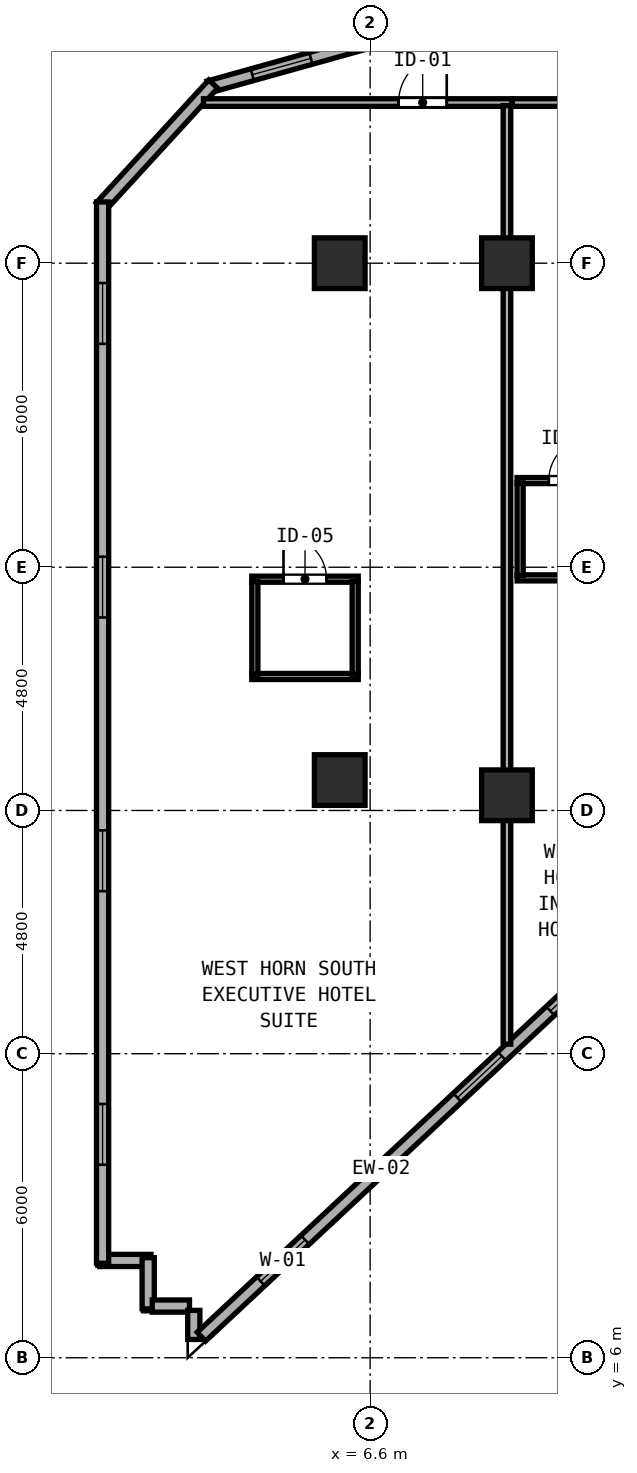
"""IFC4 building model, lengths in metres.
Left out: names, types, materials, properties, quantities, classifications, styles, units other than length and angle.
Written with IfcOpenShell. Run it as: python <this file> out.ifc"""

import sys

from ifc_helpers import new_model, si_unit, direction, frame, frame_2d, origin, origin_2d, place, context, subcontext, project, spatial, rectangle, hollow_rectangle, extrude, element, fill, save


model = new_model("IFC4")
c1 = context("Model", 3, precision=1e-05, world=origin(), true_north=direction((0.0, 1.0)))
c2 = subcontext(c1, "Body", "Model", "MODEL_VIEW")
j1 = project(units=[si_unit("LENGTHUNIT", "METRE"), si_unit("PLANEANGLEUNIT", "RADIAN")], contexts=[c1])
p1 = place(None, origin())
s1 = spatial("IfcSite", under=j1, at=p1, CompositionType="ELEMENT")
p2 = place(p1, origin())
s2 = spatial("IfcBuilding", under=s1, at=p2, CompositionType="ELEMENT")
p3 = place(p2, frame((0.0, 0.0, 85.6)))
s3 = spatial("IfcBuildingStorey", under=s2, at=p3, CompositionType="ELEMENT", Elevation=85.6)
for number, where, z_axis, x_axis in (
    (1, (6.0, 17.4, 0.0), (0.0, 0.0, 1.0), (1.0, 0.0, 0.0)),
    (2, (6.0, 27.6, 0.0), (0.0, 0.0, 1.0), (1.0, 0.0, 0.0)),
    (3, (9.3, 17.1, 0.0), (0.0, 0.0, 1.0), (1.0, 0.0, 0.0)),
    (4, (9.3, 27.6, 0.0), (0.0, 0.0, 1.0), (1.0, 0.0, 0.0)),
):
    element("IfcColumn", number, at=place(p3, frame(where, z_axis=z_axis, x_axis=x_axis)), inside=s3, PredefinedType="COLUMN", context=c2, shape_type="SweptSolid", body=[
        extrude(hollow_rectangle(XDim=1.0, YDim=1.0, WallThickness=0.038, at=origin_2d()), origin(), (0.0, 0.0, 1.0), 3.8),
    ])
for number, where, z_axis, x_axis in (
    (5, (1.265, 7.92, 0.0), (0.0, 0.0, 1.0), (1.0, 0.0, 0.0)),
    (6, (2.22, 7.975, 0.0), (0.0, 0.0, 1.0), (0.0, -1.0, 0.0)),
):
    element("IfcWall", number, at=place(p3, frame(where, z_axis=z_axis, x_axis=x_axis)), inside=s3, PredefinedType="SOLIDWALL", context=c2, shape_type="SweptSolid", body=[
        extrude(rectangle(XDim=1.01, YDim=0.24, at=frame_2d((0.505, 0.0))), origin(), (0.0, 0.0, 1.0), 3.54),
    ])
p4 = place(p3, frame((2.3, 7.02, 0.0), z_axis=(0.0, 0.0, 1.0), x_axis=(1.0, 0.0, 0.0)))
e7 = element("IfcWall", 7, at=p4, inside=s3, PredefinedType="SOLIDWALL", context=c2, shape_type="SweptSolid", body=[
    extrude(rectangle(XDim=0.735, YDim=0.24, at=frame_2d((0.367, 0.0))), origin(), (0.0, 0.0, 1.0), 3.54),
])
p5 = place(p3, frame((3.12, 6.935, 0.0), z_axis=(0.0, 0.0, 1.0), x_axis=(0.0, -1.0, 0.0)))
e8 = element("IfcWall", 8, at=p5, inside=s3, PredefinedType="SOLIDWALL", context=c2, shape_type="SweptSolid", body=[
    extrude(rectangle(XDim=0.574, YDim=0.24, at=frame_2d((0.287, 0.0))), origin(), (0.0, 0.0, 1.0), 3.54),
])
p6 = place(p3, frame((3.27, 6.416, 0.0), z_axis=(0.0, 0.0, 1.0), x_axis=(0.731064187858, 0.682308693505, 0.0)))
e9 = element("IfcWall", 9, at=p6, inside=s3, PredefinedType="SOLIDWALL", context=c2, shape_type="SweptSolid", body=[
    extrude(rectangle(XDim=11.833, YDim=0.24, at=frame_2d((5.916, 0.0))), origin(), (0.0, 0.0, 1.0), 3.54),
])
p7 = place(p6, frame((1.6, 0.0, 0.85)))
e10 = element("IfcOpeningElement", 10, at=p7, cuts=e9, PredefinedType="OPENING", context=c2, shape_type="SweptSolid", body=[
    extrude(rectangle(XDim=1.2, YDim=1.85, at=frame_2d((0.6, 0.925))), frame((0.0, 0.13, 0.0), z_axis=(0.0, -1.0, 0.0), x_axis=(1.0, 0.0, 0.0)), (0.0, 0.0, 1.0), 0.26),
])
p8 = place(p6, frame((6.912, 0.0, 0.85)))
e11 = element("IfcOpeningElement", 11, at=p8, cuts=e9, PredefinedType="OPENING", context=c2, shape_type="SweptSolid", body=[
    extrude(rectangle(XDim=1.2, YDim=1.85, at=frame_2d((0.6, 0.925))), frame((0.0, 0.13, 0.0), z_axis=(0.0, -1.0, 0.0), x_axis=(1.0, 0.0, 0.0)), (0.0, 0.0, 1.0), 0.26),
])
p9 = place(p6, frame((9.421, 0.0, 0.85)))
e12 = element("IfcOpeningElement", 12, at=p9, cuts=e9, PredefinedType="OPENING", context=c2, shape_type="SweptSolid", body=[
    extrude(rectangle(XDim=1.2, YDim=1.85, at=frame_2d((0.6, 0.925))), frame((0.0, 0.13, 0.0), z_axis=(0.0, -1.0, 0.0), x_axis=(1.0, 0.0, 0.0)), (0.0, 0.0, 1.0), 0.26),
])
p10 = place(p3, frame((12.173, 33.524, 0.0), z_axis=(0.0, 0.0, 1.0), x_axis=(-0.963197271032, -0.268795493036, 0.0)))
e13 = element("IfcWall", 13, at=p10, inside=s3, PredefinedType="SOLIDWALL", context=c2, shape_type="SweptSolid", body=[
    extrude(rectangle(XDim=9.095, YDim=0.24, at=frame_2d((4.548, 0.0))), origin(), (0.0, 0.0, 1.0), 3.54),
])
p11 = place(p10, frame((1.6, 0.0, 0.85)))
e14 = element("IfcOpeningElement", 14, at=p11, cuts=e13, PredefinedType="OPENING", context=c2, shape_type="SweptSolid", body=[
    extrude(rectangle(XDim=1.2, YDim=1.85, at=frame_2d((0.6, 0.925))), frame((0.0, 0.13, 0.0), z_axis=(0.0, -1.0, 0.0), x_axis=(1.0, 0.0, 0.0)), (0.0, 0.0, 1.0), 0.26),
])
p12 = place(p10, frame((7.0, 0.0, 0.85)))
e15 = element("IfcOpeningElement", 15, at=p12, cuts=e13, PredefinedType="OPENING", context=c2, shape_type="SweptSolid", body=[
    extrude(rectangle(XDim=1.2, YDim=1.85, at=frame_2d((0.6, 0.925))), frame((0.0, 0.13, 0.0), z_axis=(0.0, -1.0, 0.0), x_axis=(1.0, 0.0, 0.0)), (0.0, 0.0, 1.0), 0.26),
])
p13 = place(p3, frame((3.502, 31.134, 0.0), z_axis=(0.0, 0.0, 1.0), x_axis=(-0.675781844312, -0.737101688302, 0.0)))
e16 = element("IfcWall", 16, at=p13, inside=s3, PredefinedType="SOLIDWALL", context=c2, shape_type="SweptSolid", body=[
    extrude(rectangle(XDim=3.285, YDim=0.24, at=frame_2d((1.642, 0.0))), origin(), (0.0, 0.0, 1.0), 3.54),
])
p14 = place(p3, frame((1.32, 28.808, 0.0), z_axis=(0.0, 0.0, 1.0), x_axis=(0.0, -1.0, 0.0)))
e17 = element("IfcWall", 17, at=p14, inside=s3, PredefinedType="SOLIDWALL", context=c2, shape_type="SweptSolid", body=[
    extrude(rectangle(XDim=20.943, YDim=0.24, at=frame_2d((10.472, 0.0))), origin(), (0.0, 0.0, 1.0), 3.54),
])
p15 = place(p14, frame((1.6, 0.0, 0.85)))
e18 = element("IfcOpeningElement", 18, at=p15, cuts=e17, PredefinedType="OPENING", context=c2, shape_type="SweptSolid", body=[
    extrude(rectangle(XDim=1.2, YDim=1.85, at=frame_2d((0.6, 0.925))), frame((0.0, 0.13, 0.0), z_axis=(0.0, -1.0, 0.0), x_axis=(1.0, 0.0, 0.0)), (0.0, 0.0, 1.0), 0.26),
])
p16 = place(p14, frame((7.0, 0.0, 0.85)))
e19 = element("IfcOpeningElement", 19, at=p16, cuts=e17, PredefinedType="OPENING", context=c2, shape_type="SweptSolid", body=[
    extrude(rectangle(XDim=1.2, YDim=1.85, at=frame_2d((0.6, 0.925))), frame((0.0, 0.13, 0.0), z_axis=(0.0, -1.0, 0.0), x_axis=(1.0, 0.0, 0.0)), (0.0, 0.0, 1.0), 0.26),
])
p17 = place(p14, frame((12.4, 0.0, 0.85)))
e20 = element("IfcOpeningElement", 20, at=p17, cuts=e17, PredefinedType="OPENING", context=c2, shape_type="SweptSolid", body=[
    extrude(rectangle(XDim=1.2, YDim=1.85, at=frame_2d((0.6, 0.925))), frame((0.0, 0.13, 0.0), z_axis=(0.0, -1.0, 0.0), x_axis=(1.0, 0.0, 0.0)), (0.0, 0.0, 1.0), 0.26),
])
p18 = place(p14, frame((17.8, 0.0, 0.85)))
e21 = element("IfcOpeningElement", 21, at=p18, cuts=e17, PredefinedType="OPENING", context=c2, shape_type="SweptSolid", body=[
    extrude(rectangle(XDim=1.2, YDim=1.85, at=frame_2d((0.6, 0.925))), frame((0.0, 0.13, 0.0), z_axis=(0.0, -1.0, 0.0), x_axis=(1.0, 0.0, 0.0)), (0.0, 0.0, 1.0), 0.26),
])
p19 = place(p3, frame((3.311, 30.77, 0.0), z_axis=(0.0, 0.0, 1.0), x_axis=(1.0, 0.0, 0.0)))
e22 = element("IfcWall", 22, at=p19, inside=s3, PredefinedType="PARTITIONING", context=c2, shape_type="SweptSolid", body=[
    extrude(rectangle(XDim=6.089, YDim=0.15, at=frame_2d((3.044, 0.0))), origin(), (0.0, 0.0, 1.0), 3.54),
])
p20 = place(p19, frame((4.801, 0.0, 0.0), z_axis=(0.0, 0.0, 1.0), x_axis=(-1.0, 0.0, 0.0)))
e23 = element("IfcOpeningElement", 23, at=p20, cuts=e22, PredefinedType="OPENING", context=c2, shape_type="SweptSolid", body=[
    extrude(rectangle(XDim=0.95, YDim=2.18, at=frame_2d((0.475, 1.09))), frame((0.0, 0.085, 0.0), z_axis=(0.0, -1.0, 0.0), x_axis=(1.0, 0.0, 0.0)), (0.0, 0.0, 1.0), 0.17),
])
p21 = place(p3, frame((9.3, 12.188, 0.0), z_axis=(0.0, 0.0, 1.0), x_axis=(0.0, 1.0, 0.0)))
e24 = element("IfcWall", 24, at=p21, inside=s3, PredefinedType="PARTITIONING", context=c2, shape_type="SweptSolid", body=[
    extrude(rectangle(XDim=18.522, YDim=0.15, at=frame_2d((9.261, 0.0))), origin(), (0.0, 0.0, 1.0), 3.54),
])
p22 = place(p3, frame((4.265, 21.364, 0.0), z_axis=(0.0, 0.0, 1.0), x_axis=(1.0, 0.0, 0.0)))
e25 = element("IfcWall", 25, at=p22, inside=s3, PredefinedType="PARTITIONING", context=c2, shape_type="SweptSolid", body=[
    extrude(rectangle(XDim=2.1, YDim=0.12, at=frame_2d((1.05, 0.0))), origin(), (0.0, 0.0, 1.0), 3.54),
])
p23 = place(p22, frame((1.475, 0.0, 0.0), z_axis=(0.0, 0.0, 1.0), x_axis=(-1.0, 0.0, 0.0)))
e26 = element("IfcOpeningElement", 26, at=p23, cuts=e25, PredefinedType="OPENING", context=c2, shape_type="SweptSolid", body=[
    extrude(rectangle(XDim=0.85, YDim=2.1, at=frame_2d((0.425, 1.05))), frame((0.0, 0.07, 0.0), z_axis=(0.0, -1.0, 0.0), x_axis=(1.0, 0.0, 0.0)), (0.0, 0.0, 1.0), 0.14),
])
p24 = place(p3, frame((4.265, 19.444, 0.0), z_axis=(0.0, 0.0, 1.0), x_axis=(1.0, 0.0, 0.0)))
e27 = element("IfcWall", 27, at=p24, inside=s3, PredefinedType="PARTITIONING", context=c2, shape_type="SweptSolid", body=[
    extrude(rectangle(XDim=2.1, YDim=0.12, at=frame_2d((1.05, 0.0))), origin(), (0.0, 0.0, 1.0), 3.54),
])
for number, where, z_axis, x_axis in (
    (28, (4.325, 19.489, 0.0), (0.0, 0.0, 1.0), (0.0, 1.0, 0.0)),
    (29, (6.305, 19.489, 0.0), (0.0, 0.0, 1.0), (0.0, 1.0, 0.0)),
):
    element("IfcWall", number, at=place(p3, frame(where, z_axis=z_axis, x_axis=x_axis)), inside=s3, PredefinedType="PARTITIONING", context=c2, shape_type="SweptSolid", body=[
        extrude(rectangle(XDim=1.83, YDim=0.12, at=frame_2d((0.915, 0.0))), origin(), (0.0, 0.0, 1.0), 3.54),
    ])
p25 = place(p3, frame((9.402, 30.77, 0.0), z_axis=(0.0, 0.0, 1.0), x_axis=(1.0, 0.0, 0.0)))
e30 = element("IfcWall", 30, at=p25, inside=s3, PredefinedType="PARTITIONING", context=c2, shape_type="SweptSolid", body=[
    extrude(rectangle(XDim=2.296, YDim=0.15, at=frame_2d((1.148, 0.0))), origin(), (0.0, 0.0, 1.0), 3.54),
])
p26 = place(p25, frame((1.934, 0.0, 0.0), z_axis=(0.0, 0.0, 1.0), x_axis=(-1.0, 0.0, 0.0)))
e31 = element("IfcOpeningElement", 31, at=p26, cuts=e30, PredefinedType="OPENING", context=c2, shape_type="SweptSolid", body=[
    extrude(rectangle(XDim=0.95, YDim=2.15, at=frame_2d((0.475, 1.075))), frame((0.0, 0.085, 0.0), z_axis=(0.0, -1.0, 0.0), x_axis=(1.0, 0.0, 0.0)), (0.0, 0.0, 1.0), 0.17),
])
p27 = place(p3, frame((9.5, 23.31, 0.0), z_axis=(0.0, 0.0, 1.0), x_axis=(1.0, 0.0, 0.0)))
e32 = element("IfcWall", 32, at=p27, inside=s3, PredefinedType="PARTITIONING", context=c2, shape_type="SweptSolid", body=[
    extrude(rectangle(XDim=2.1, YDim=0.12, at=frame_2d((1.05, 0.0))), origin(), (0.0, 0.0, 1.0), 3.54),
])
p28 = place(p27, frame((1.475, 0.0, 0.0), z_axis=(0.0, 0.0, 1.0), x_axis=(-1.0, 0.0, 0.0)))
e33 = element("IfcOpeningElement", 33, at=p28, cuts=e32, PredefinedType="OPENING", context=c2, shape_type="SweptSolid", body=[
    extrude(rectangle(XDim=0.85, YDim=2.1, at=frame_2d((0.425, 1.05))), frame((0.0, 0.07, 0.0), z_axis=(0.0, -1.0, 0.0), x_axis=(1.0, 0.0, 0.0)), (0.0, 0.0, 1.0), 0.14),
])
p29 = place(p3, frame((9.5, 21.39, 0.0), z_axis=(0.0, 0.0, 1.0), x_axis=(1.0, 0.0, 0.0)))
e34 = element("IfcWall", 34, at=p29, inside=s3, PredefinedType="PARTITIONING", context=c2, shape_type="SweptSolid", body=[
    extrude(rectangle(XDim=2.1, YDim=0.12, at=frame_2d((1.05, 0.0))), origin(), (0.0, 0.0, 1.0), 3.54),
])
p30 = place(p3, frame((9.56, 21.435, 0.0), z_axis=(0.0, 0.0, 1.0), x_axis=(0.0, 1.0, 0.0)))
e35 = element("IfcWall", 35, at=p30, inside=s3, PredefinedType="PARTITIONING", context=c2, shape_type="SweptSolid", body=[
    extrude(rectangle(XDim=1.83, YDim=0.12, at=frame_2d((0.915, 0.0))), origin(), (0.0, 0.0, 1.0), 3.54),
])
p31 = place(p7, origin())
e36 = element("IfcWindow", 36, at=p31, inside=s3, PartitioningType="SINGLE_PANEL", PredefinedType="WINDOW", context=c2, shape_type="SweptSolid", body=[
    extrude(rectangle(XDim=1.2, YDim=1.85, at=frame_2d((0.6, 0.925))), frame((0.0, 0.03, 0.0), z_axis=(0.0, -1.0, 0.0), x_axis=(1.0, 0.0, 0.0)), (0.0, 0.0, 1.0), 0.06),
])
fill(e10, e36)
p32 = place(p8, origin())
e37 = element("IfcWindow", 37, at=p32, inside=s3, PartitioningType="SINGLE_PANEL", PredefinedType="WINDOW", context=c2, shape_type="SweptSolid", body=[
    extrude(rectangle(XDim=1.2, YDim=1.85, at=frame_2d((0.6, 0.925))), frame((0.0, 0.03, 0.0), z_axis=(0.0, -1.0, 0.0), x_axis=(1.0, 0.0, 0.0)), (0.0, 0.0, 1.0), 0.06),
])
fill(e11, e37)
p33 = place(p12, origin())
e38 = element("IfcWindow", 38, at=p33, inside=s3, PartitioningType="SINGLE_PANEL", PredefinedType="WINDOW", context=c2, shape_type="SweptSolid", body=[
    extrude(rectangle(XDim=1.2, YDim=1.85, at=frame_2d((0.6, 0.925))), frame((0.0, 0.03, 0.0), z_axis=(0.0, -1.0, 0.0), x_axis=(1.0, 0.0, 0.0)), (0.0, 0.0, 1.0), 0.06),
])
fill(e15, e38)
p34 = place(p15, origin())
e39 = element("IfcWindow", 39, at=p34, inside=s3, PartitioningType="SINGLE_PANEL", PredefinedType="WINDOW", context=c2, shape_type="SweptSolid", body=[
    extrude(rectangle(XDim=1.2, YDim=1.85, at=frame_2d((0.6, 0.925))), frame((0.0, 0.03, 0.0), z_axis=(0.0, -1.0, 0.0), x_axis=(1.0, 0.0, 0.0)), (0.0, 0.0, 1.0), 0.06),
])
fill(e18, e39)
p35 = place(p16, origin())
e40 = element("IfcWindow", 40, at=p35, inside=s3, PartitioningType="SINGLE_PANEL", PredefinedType="WINDOW", context=c2, shape_type="SweptSolid", body=[
    extrude(rectangle(XDim=1.2, YDim=1.85, at=frame_2d((0.6, 0.925))), frame((0.0, 0.03, 0.0), z_axis=(0.0, -1.0, 0.0), x_axis=(1.0, 0.0, 0.0)), (0.0, 0.0, 1.0), 0.06),
])
fill(e19, e40)
p36 = place(p17, origin())
e41 = element("IfcWindow", 41, at=p36, inside=s3, PartitioningType="SINGLE_PANEL", PredefinedType="WINDOW", context=c2, shape_type="SweptSolid", body=[
    extrude(rectangle(XDim=1.2, YDim=1.85, at=frame_2d((0.6, 0.925))), frame((0.0, 0.03, 0.0), z_axis=(0.0, -1.0, 0.0), x_axis=(1.0, 0.0, 0.0)), (0.0, 0.0, 1.0), 0.06),
])
fill(e20, e41)
p37 = place(p18, origin())
e42 = element("IfcWindow", 42, at=p37, inside=s3, PartitioningType="SINGLE_PANEL", PredefinedType="WINDOW", context=c2, shape_type="SweptSolid", body=[
    extrude(rectangle(XDim=1.2, YDim=1.85, at=frame_2d((0.6, 0.925))), frame((0.0, 0.03, 0.0), z_axis=(0.0, -1.0, 0.0), x_axis=(1.0, 0.0, 0.0)), (0.0, 0.0, 1.0), 0.06),
])
fill(e21, e42)
p38 = place(p20, origin())
e43 = element("IfcDoor", 43, at=p38, inside=s3, OperationType="SINGLE_SWING_LEFT", PredefinedType="DOOR", context=c2, shape_type="SweptSolid", body=[
    extrude(rectangle(XDim=0.95, YDim=2.18, at=frame_2d((0.475, 1.09))), frame((0.0, 0.025, 0.0), z_axis=(0.0, -1.0, 0.0), x_axis=(1.0, 0.0, 0.0)), (0.0, 0.0, 1.0), 0.05),
])
fill(e23, e43)
p39 = place(p23, origin())
e44 = element("IfcDoor", 44, at=p39, inside=s3, OperationType="SINGLE_SWING_RIGHT", PredefinedType="DOOR", context=c2, shape_type="SweptSolid", body=[
    extrude(rectangle(XDim=0.85, YDim=2.1, at=frame_2d((0.425, 1.05))), frame((0.0, 0.025, 0.0), z_axis=(0.0, -1.0, 0.0), x_axis=(1.0, 0.0, 0.0)), (0.0, 0.0, 1.0), 0.05),
])
fill(e26, e44)
p40 = place(p28, origin())
e45 = element("IfcDoor", 45, at=p40, inside=s3, OperationType="SINGLE_SWING_LEFT", PredefinedType="DOOR", context=c2, shape_type="SweptSolid", body=[
    extrude(rectangle(XDim=0.85, YDim=2.1, at=frame_2d((0.425, 1.05))), frame((0.0, 0.025, 0.0), z_axis=(0.0, -1.0, 0.0), x_axis=(1.0, 0.0, 0.0)), (0.0, 0.0, 1.0), 0.05),
])
fill(e33, e45)
p41 = place(p9, origin())
e46 = element("IfcWindow", 46, at=p41, inside=s3, PartitioningType="SINGLE_PANEL", PredefinedType="WINDOW", context=c2, shape_type="SweptSolid", body=[
    extrude(rectangle(XDim=1.2, YDim=1.85, at=frame_2d((0.6, 0.925))), frame((0.0, 0.03, 0.0), z_axis=(0.0, -1.0, 0.0), x_axis=(1.0, 0.0, 0.0)), (0.0, 0.0, 1.0), 0.06),
])
fill(e12, e46)
save(model, sys.argv[1])
